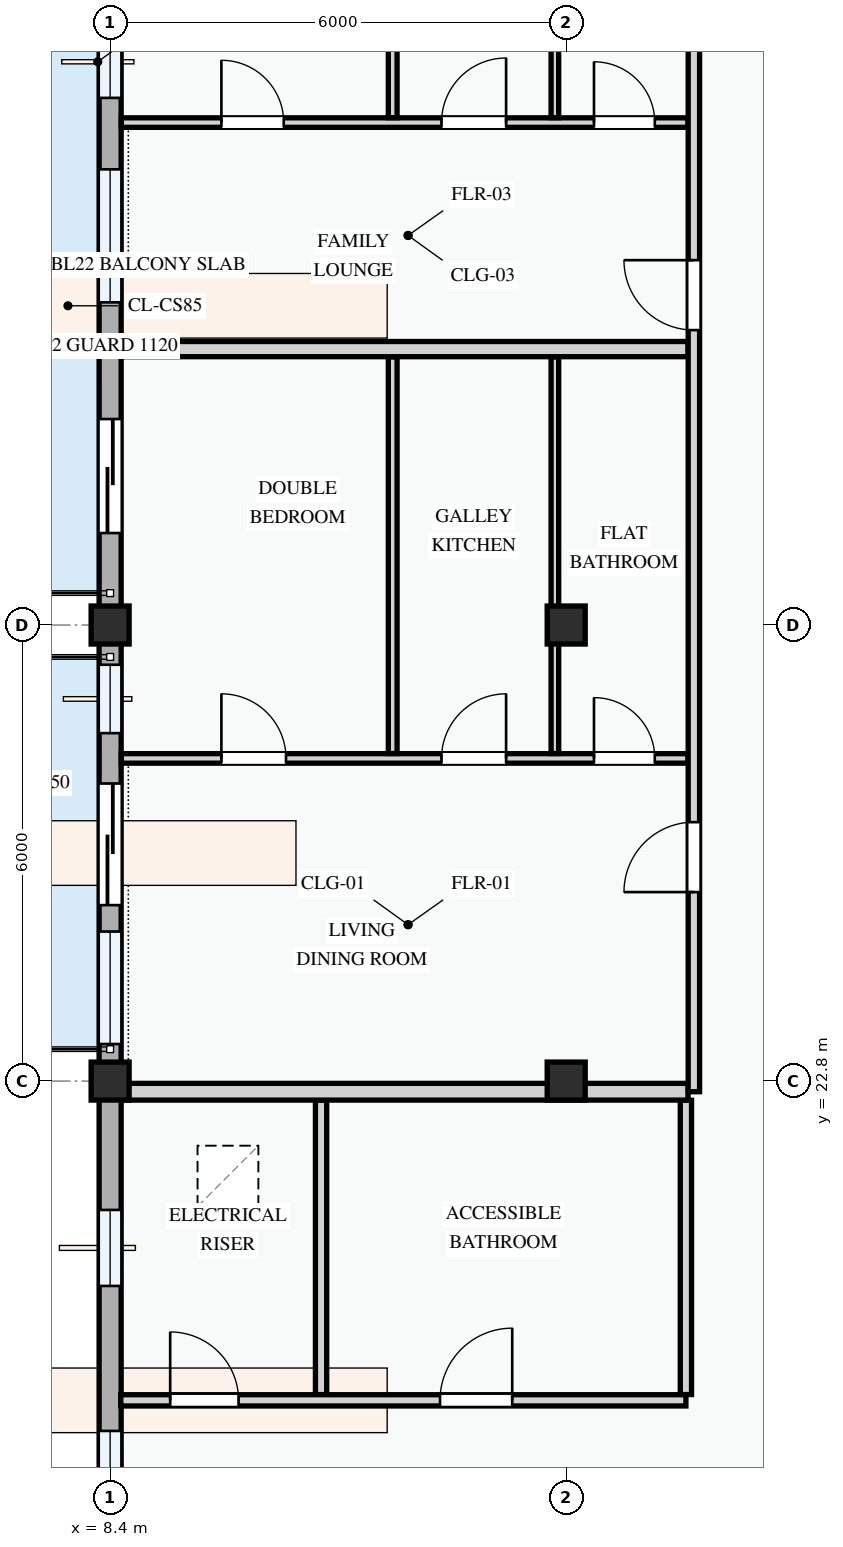
"""IFC4 building model, lengths in metres.
Left out: names, types, materials, properties, quantities, classifications, styles, units other than length and angle.
Written with IfcOpenShell. Run it as: python <this file> out.ifc"""

import sys

from ifc_helpers import new_model, si_unit, direction, frame, frame_2d, origin, origin_2d, place, context, subcontext, project, spatial, rectangle, extrude, element, fill, save


model = new_model("IFC4")
c1 = context("Model", 3, precision=1e-05, world=origin(), true_north=direction((0.0, 1.0)))
c2 = subcontext(c1, "Body", "Model", "MODEL_VIEW")
j1 = project(units=[si_unit("LENGTHUNIT", "METRE"), si_unit("PLANEANGLEUNIT", "RADIAN")], contexts=[c1])
p1 = place(None, origin())
s1 = spatial("IfcSite", under=j1, at=p1, CompositionType="ELEMENT")
p2 = place(p1, origin())
s2 = spatial("IfcBuilding", under=s1, at=p2, CompositionType="ELEMENT")
p3 = place(p2, frame((0.0, 0.0, 21.3)))
s3 = spatial("IfcBuildingStorey", under=s2, at=p3, CompositionType="ELEMENT", Elevation=21.3)
for number, where, z_axis, x_axis in (
    (1, (8.4, 22.8, 0.0), (0.0, 0.0, 1.0), (1.0, 0.0, 0.0)),
    (2, (8.4, 28.8, 0.0), (0.0, 0.0, 1.0), (1.0, 0.0, 0.0)),
    (3, (14.4, 22.8, 0.0), (0.0, 0.0, 1.0), (1.0, 0.0, 0.0)),
    (4, (14.4, 28.8, 0.0), (0.0, 0.0, 1.0), (1.0, 0.0, 0.0)),
):
    element("IfcColumn", number, at=place(p3, frame(where, z_axis=z_axis, x_axis=x_axis)), inside=s3, PredefinedType="COLUMN", context=c2, shape_type="SweptSolid", body=[
        extrude(rectangle(XDim=0.5, YDim=0.5, at=origin_2d()), origin(), (0.0, 0.0, 1.0), 3.3),
    ])
p4 = place(p3, frame((8.4, 37.2, 0.0), z_axis=(0.0, 0.0, 1.0), x_axis=(0.0, -1.0, 0.0)))
e5 = element("IfcWall", 5, at=p4, inside=s3, PredefinedType="STANDARD", context=c2, shape_type="SweptSolid", body=[
    extrude(rectangle(XDim=8.4, YDim=0.29, at=frame_2d((4.2, 0.0))), origin(), (0.0, 0.0, 1.0), 2.345),
])
p5 = place(p4, frame((5.69, 0.0, 0.0)))
e6 = element("IfcOpeningElement", 6, at=p5, cuts=e5, PredefinedType="OPENING", context=c2, shape_type="SweptSolid", body=[
    extrude(rectangle(XDim=1.5, YDim=2.2, at=frame_2d((0.75, 1.1))), frame((0.0, 0.155, 0.0), z_axis=(0.0, -1.0, 0.0), x_axis=(1.0, 0.0, 0.0)), (0.0, 0.0, 1.0), 0.31),
])
p6 = place(p4, frame((0.515, 0.0, 0.78)))
e7 = element("IfcOpeningElement", 7, at=p6, cuts=e5, PredefinedType="OPENING", context=c2, shape_type="SweptSolid", body=[
    extrude(rectangle(XDim=0.95, YDim=1.15, at=frame_2d((0.475, 0.575))), frame((0.0, 0.155, 0.0), z_axis=(0.0, -1.0, 0.0), x_axis=(1.0, 0.0, 0.0)), (0.0, 0.0, 1.0), 0.31),
])
p7 = place(p4, frame((2.405, 0.0, 0.78)))
e8 = element("IfcOpeningElement", 8, at=p7, cuts=e5, PredefinedType="OPENING", context=c2, shape_type="SweptSolid", body=[
    extrude(rectangle(XDim=1.75, YDim=1.45, at=frame_2d((0.875, 0.725))), frame((0.0, 0.155, 0.0), z_axis=(0.0, -1.0, 0.0), x_axis=(1.0, 0.0, 0.0)), (0.0, 0.0, 1.0), 0.31),
])
p8 = place(p3, frame((8.4, 28.8, 0.0), z_axis=(0.0, 0.0, 1.0), x_axis=(0.0, -1.0, 0.0)))
e9 = element("IfcWall", 9, at=p8, inside=s3, PredefinedType="STANDARD", context=c2, shape_type="SweptSolid", body=[
    extrude(rectangle(XDim=6.0, YDim=0.29, at=frame_2d((3.0, 0.0))), origin(), (0.0, 0.0, 1.0), 2.445),
])
p9 = place(p8, frame((2.085, 0.0, 0.0)))
e10 = element("IfcOpeningElement", 10, at=p9, cuts=e9, PredefinedType="OPENING", context=c2, shape_type="SweptSolid", body=[
    extrude(rectangle(XDim=1.6, YDim=2.2, at=frame_2d((0.8, 1.1))), frame((0.0, 0.155, 0.0), z_axis=(0.0, -1.0, 0.0), x_axis=(1.0, 0.0, 0.0)), (0.0, 0.0, 1.0), 0.31),
])
p10 = place(p8, frame((0.522, 0.0, 0.78)))
e11 = element("IfcOpeningElement", 11, at=p10, cuts=e9, PredefinedType="OPENING", context=c2, shape_type="SweptSolid", body=[
    extrude(rectangle(XDim=0.9, YDim=1.2, at=frame_2d((0.45, 0.6))), frame((0.0, 0.155, 0.0), z_axis=(0.0, -1.0, 0.0), x_axis=(1.0, 0.0, 0.0)), (0.0, 0.0, 1.0), 0.31),
])
p11 = place(p8, frame((4.032, 0.0, 0.78)))
e12 = element("IfcOpeningElement", 12, at=p11, cuts=e9, PredefinedType="OPENING", context=c2, shape_type="SweptSolid", body=[
    extrude(rectangle(XDim=1.48, YDim=1.52, at=frame_2d((0.74, 0.76))), frame((0.0, 0.155, 0.0), z_axis=(0.0, -1.0, 0.0), x_axis=(1.0, 0.0, 0.0)), (0.0, 0.0, 1.0), 0.31),
])
p12 = place(p3, frame((8.4, 22.8, 0.0), z_axis=(0.0, 0.0, 1.0), x_axis=(0.0, -1.0, 0.0)))
e13 = element("IfcWall", 13, at=p12, inside=s3, PredefinedType="STANDARD", context=c2, shape_type="SweptSolid", body=[
    extrude(rectangle(XDim=8.4, YDim=0.29, at=frame_2d((4.2, 0.0))), origin(), (0.0, 0.0, 1.0), 2.345),
])
p13 = place(p12, frame((1.695, 0.0, 0.78)))
e14 = element("IfcOpeningElement", 14, at=p13, cuts=e13, PredefinedType="OPENING", context=c2, shape_type="SweptSolid", body=[
    extrude(rectangle(XDim=1.0, YDim=1.25, at=frame_2d((0.5, 0.625))), frame((0.0, 0.155, 0.0), z_axis=(0.0, -1.0, 0.0), x_axis=(1.0, 0.0, 0.0)), (0.0, 0.0, 1.0), 0.31),
])
p14 = place(p12, frame((4.603, 0.0, 0.78)))
e15 = element("IfcOpeningElement", 15, at=p14, cuts=e13, PredefinedType="OPENING", context=c2, shape_type="SweptSolid", body=[
    extrude(rectangle(XDim=2.12, YDim=1.44, at=frame_2d((1.06, 0.72))), frame((0.0, 0.155, 0.0), z_axis=(0.0, -1.0, 0.0), x_axis=(1.0, 0.0, 0.0)), (0.0, 0.0, 1.0), 0.31),
])
for number, where, z_axis, x_axis in (
    (16, (11.175, 18.676, 0.0), (0.0, 0.0, 1.0), (0.0, 1.0, 0.0)),
    (17, (15.975, 18.676, 0.0), (0.0, 0.0, 1.0), (0.0, 1.0, 0.0)),
):
    element("IfcWall", number, at=place(p3, frame(where, z_axis=z_axis, x_axis=x_axis)), inside=s3, PredefinedType="PARTITIONING", context=c2, shape_type="SweptSolid", body=[
        extrude(rectangle(XDim=3.872, YDim=0.148, at=frame_2d((1.936, 0.0))), origin(), (0.0, 0.0, 1.0), 3.0),
    ])
p15 = place(p3, frame((8.54, 18.6, 0.0), z_axis=(0.0, 0.0, 1.0), x_axis=(1.0, 0.0, 0.0)))
e18 = element("IfcWall", 18, at=p15, inside=s3, PredefinedType="PARTITIONING", context=c2, shape_type="SweptSolid", body=[
    extrude(rectangle(XDim=7.435, YDim=0.148, at=frame_2d((3.718, 0.0))), origin(), (0.0, 0.0, 1.0), 3.0),
])
p16 = place(p15, frame((0.65, 0.0, 0.0)))
e19 = element("IfcOpeningElement", 19, at=p16, cuts=e18, PredefinedType="OPENING", context=c2, shape_type="SweptSolid", body=[
    extrude(rectangle(XDim=0.9, YDim=2.1, at=frame_2d((0.45, 1.05))), frame((0.0, 0.084, 0.0), z_axis=(0.0, -1.0, 0.0), x_axis=(1.0, 0.0, 0.0)), (0.0, 0.0, 1.0), 0.168),
])
p17 = place(p15, frame((4.2, 0.0, 0.0)))
e20 = element("IfcOpeningElement", 20, at=p17, cuts=e18, PredefinedType="OPENING", context=c2, shape_type="SweptSolid", body=[
    extrude(rectangle(XDim=0.95, YDim=2.1, at=frame_2d((0.475, 1.05))), frame((0.0, 0.084, 0.0), z_axis=(0.0, -1.0, 0.0), x_axis=(1.0, 0.0, 0.0)), (0.0, 0.0, 1.0), 0.168),
])
p18 = place(p3, frame((8.547, 27.045, 0.0), z_axis=(0.0, 0.0, 1.0), x_axis=(1.0, 0.0, 0.0)))
e21 = element("IfcWall", 21, at=p18, inside=s3, PredefinedType="PARTITIONING", context=c2, shape_type="SweptSolid", body=[
    extrude(rectangle(XDim=7.456, YDim=0.125, at=frame_2d((3.728, 0.0))), origin(), (0.0, 0.0, 1.0), 3.0),
])
p19 = place(p18, frame((1.317, 0.0, 0.0)))
e22 = element("IfcOpeningElement", 22, at=p19, cuts=e21, PredefinedType="OPENING", context=c2, shape_type="SweptSolid", body=[
    extrude(rectangle(XDim=0.85, YDim=2.1, at=frame_2d((0.425, 1.05))), frame((0.0, 0.073, 0.0), z_axis=(0.0, -1.0, 0.0), x_axis=(1.0, 0.0, 0.0)), (0.0, 0.0, 1.0), 0.145),
])
p20 = place(p18, frame((4.212, 0.0, 0.0)))
e23 = element("IfcOpeningElement", 23, at=p20, cuts=e21, PredefinedType="OPENING", context=c2, shape_type="SweptSolid", body=[
    extrude(rectangle(XDim=0.85, YDim=2.1, at=frame_2d((0.425, 1.05))), frame((0.0, 0.073, 0.0), z_axis=(0.0, -1.0, 0.0), x_axis=(1.0, 0.0, 0.0)), (0.0, 0.0, 1.0), 0.145),
])
p21 = place(p18, frame((6.219, 0.0, 0.0)))
e24 = element("IfcOpeningElement", 24, at=p21, cuts=e21, PredefinedType="OPENING", context=c2, shape_type="SweptSolid", body=[
    extrude(rectangle(XDim=0.8, YDim=2.1, at=frame_2d((0.4, 1.05))), frame((0.0, 0.073, 0.0), z_axis=(0.0, -1.0, 0.0), x_axis=(1.0, 0.0, 0.0)), (0.0, 0.0, 1.0), 0.145),
])
p22 = place(p3, frame((12.118, 27.11, 0.0), z_axis=(0.0, 0.0, 1.0), x_axis=(0.0, 1.0, 0.0)))
e25 = element("IfcWall", 25, at=p22, inside=s3, PredefinedType="PARTITIONING", context=c2, shape_type="SweptSolid", body=[
    extrude(rectangle(XDim=5.218, YDim=0.115, at=frame_2d((2.609, 0.0))), origin(), (0.0, 0.0, 1.0), 3.0),
])
p23 = place(p3, frame((14.251, 27.11, 0.0), z_axis=(0.0, 0.0, 1.0), x_axis=(0.0, 1.0, 0.0)))
e26 = element("IfcWall", 26, at=p23, inside=s3, PredefinedType="PARTITIONING", context=c2, shape_type="SweptSolid", body=[
    extrude(rectangle(XDim=5.218, YDim=0.1, at=frame_2d((2.609, 0.0))), origin(), (0.0, 0.0, 1.0), 2.425),
])
p24 = place(p3, frame((8.547, 22.66, 0.0), z_axis=(0.0, 0.0, 1.0), x_axis=(1.0, 0.0, 0.0)))
e27 = element("IfcWall", 27, at=p24, inside=s3, PredefinedType="PARTITIONING", context=c2, shape_type="SweptSolid", body=[
    extrude(rectangle(XDim=7.456, YDim=0.22, at=frame_2d((3.728, 0.0))), origin(), (0.0, 0.0, 1.0), 2.375),
])
p25 = place(p3, frame((8.547, 35.41, 0.0), z_axis=(0.0, 0.0, 1.0), x_axis=(1.0, 0.0, 0.0)))
e28 = element("IfcWall", 28, at=p25, inside=s3, PredefinedType="PARTITIONING", context=c2, shape_type="SweptSolid", body=[
    extrude(rectangle(XDim=7.456, YDim=0.125, at=frame_2d((3.728, 0.0))), origin(), (0.0, 0.0, 1.0), 3.0),
])
p26 = place(p25, frame((1.317, 0.0, 0.0)))
e29 = element("IfcOpeningElement", 29, at=p26, cuts=e28, PredefinedType="OPENING", context=c2, shape_type="SweptSolid", body=[
    extrude(rectangle(XDim=0.82, YDim=2.08, at=frame_2d((0.41, 1.04))), frame((0.0, 0.073, 0.0), z_axis=(0.0, -1.0, 0.0), x_axis=(1.0, 0.0, 0.0)), (0.0, 0.0, 1.0), 0.145),
])
p27 = place(p25, frame((4.212, 0.0, 0.0)))
e30 = element("IfcOpeningElement", 30, at=p27, cuts=e28, PredefinedType="OPENING", context=c2, shape_type="SweptSolid", body=[
    extrude(rectangle(XDim=0.85, YDim=2.1, at=frame_2d((0.425, 1.05))), frame((0.0, 0.073, 0.0), z_axis=(0.0, -1.0, 0.0), x_axis=(1.0, 0.0, 0.0)), (0.0, 0.0, 1.0), 0.145),
])
p28 = place(p25, frame((6.219, 0.0, 0.0)))
e31 = element("IfcOpeningElement", 31, at=p28, cuts=e28, PredefinedType="OPENING", context=c2, shape_type="SweptSolid", body=[
    extrude(rectangle(XDim=0.8, YDim=2.1, at=frame_2d((0.4, 1.05))), frame((0.0, 0.073, 0.0), z_axis=(0.0, -1.0, 0.0), x_axis=(1.0, 0.0, 0.0)), (0.0, 0.0, 1.0), 0.145),
])
p29 = place(p3, frame((12.118, 35.475, 0.0), z_axis=(0.0, 0.0, 1.0), x_axis=(0.0, 1.0, 0.0)))
e32 = element("IfcWall", 32, at=p29, inside=s3, PredefinedType="PARTITIONING", context=c2, shape_type="SweptSolid", body=[
    extrude(rectangle(XDim=5.821, YDim=0.115, at=frame_2d((2.91, 0.0))), origin(), (0.0, 0.0, 1.0), 3.0),
])
p30 = place(p3, frame((14.251, 35.475, 0.0), z_axis=(0.0, 0.0, 1.0), x_axis=(0.0, 1.0, 0.0)))
e33 = element("IfcWall", 33, at=p30, inside=s3, PredefinedType="PARTITIONING", context=c2, shape_type="SweptSolid", body=[
    extrude(rectangle(XDim=5.821, YDim=0.1, at=frame_2d((2.91, 0.0))), origin(), (0.0, 0.0, 1.0), 2.425),
])
p31 = place(p3, frame((8.547, 32.43, 0.0), z_axis=(0.0, 0.0, 1.0), x_axis=(1.0, 0.0, 0.0)))
e34 = element("IfcWall", 34, at=p31, inside=s3, PredefinedType="PARTITIONING", context=c2, shape_type="SweptSolid", body=[
    extrude(rectangle(XDim=7.456, YDim=0.2, at=frame_2d((3.728, 0.0))), origin(), (0.0, 0.0, 1.0), 3.0),
])
p32 = place(p3, frame((16.08, 22.66, 0.0), z_axis=(0.0, 0.0, 1.0), x_axis=(0.0, 1.0, 0.0)))
e35 = element("IfcWall", 35, at=p32, inside=s3, PredefinedType="PARTITIONING", context=c2, shape_type="SweptSolid", body=[
    extrude(rectangle(XDim=34.793, YDim=0.15, at=frame_2d((17.396, 0.0))), origin(), (0.0, 0.0, 1.0), 3.0),
])
p33 = place(p32, frame((2.627, 0.0, 0.0)))
e36 = element("IfcOpeningElement", 36, at=p33, cuts=e35, PredefinedType="OPENING", context=c2, shape_type="SweptSolid", body=[
    extrude(rectangle(XDim=0.92, YDim=2.1, at=frame_2d((0.46, 1.05))), frame((0.0, 0.085, 0.0), z_axis=(0.0, -1.0, 0.0), x_axis=(1.0, 0.0, 0.0)), (0.0, 0.0, 1.0), 0.17),
])
p34 = place(p32, frame((10.02, 0.0, 0.0)))
e37 = element("IfcOpeningElement", 37, at=p34, cuts=e35, PredefinedType="OPENING", context=c2, shape_type="SweptSolid", body=[
    extrude(rectangle(XDim=0.92, YDim=2.1, at=frame_2d((0.46, 1.05))), frame((0.0, 0.085, 0.0), z_axis=(0.0, -1.0, 0.0), x_axis=(1.0, 0.0, 0.0)), (0.0, 0.0, 1.0), 0.17),
])
p35 = place(p32, frame((24.355, 0.0, 0.0)))
e38 = element("IfcOpeningElement", 38, at=p35, cuts=e35, PredefinedType="OPENING", context=c2, shape_type="SweptSolid", body=[
    extrude(rectangle(XDim=0.92, YDim=2.1, at=frame_2d((0.46, 1.05))), frame((0.0, 0.085, 0.0), z_axis=(0.0, -1.0, 0.0), x_axis=(1.0, 0.0, 0.0)), (0.0, 0.0, 1.0), 0.17),
])
p36 = place(p5, frame((1.5, 0.0, 0.0), z_axis=(0.0, 0.0, 1.0), x_axis=(-1.0, 0.0, 0.0)))
e39 = element("IfcDoor", 39, at=p36, inside=s3, OperationType="SLIDING_TO_RIGHT", PredefinedType="DOOR", context=c2, shape_type="SweptSolid", body=[
    extrude(rectangle(XDim=1.5, YDim=2.2, at=frame_2d((0.75, 1.1))), frame((0.0, 0.025, 0.0), z_axis=(0.0, -1.0, 0.0), x_axis=(1.0, 0.0, 0.0)), (0.0, 0.0, 1.0), 0.05),
])
fill(e6, e39)
p37 = place(p6, origin())
e40 = element("IfcWindow", 40, at=p37, inside=s3, PartitioningType="SINGLE_PANEL", PredefinedType="WINDOW", context=c2, shape_type="SweptSolid", body=[
    extrude(rectangle(XDim=0.95, YDim=1.15, at=frame_2d((0.475, 0.575))), frame((0.0, 0.03, 0.0), z_axis=(0.0, -1.0, 0.0), x_axis=(1.0, 0.0, 0.0)), (0.0, 0.0, 1.0), 0.06),
])
fill(e7, e40)
p38 = place(p7, origin())
e41 = element("IfcWindow", 41, at=p38, inside=s3, PartitioningType="DOUBLE_PANEL_VERTICAL", PredefinedType="WINDOW", context=c2, shape_type="SweptSolid", body=[
    extrude(rectangle(XDim=1.75, YDim=1.45, at=frame_2d((0.875, 0.725))), frame((0.0, 0.03, 0.0), z_axis=(0.0, -1.0, 0.0), x_axis=(1.0, 0.0, 0.0)), (0.0, 0.0, 1.0), 0.06),
])
fill(e8, e41)
p39 = place(p9, frame((1.6, 0.0, 0.0), z_axis=(0.0, 0.0, 1.0), x_axis=(-1.0, 0.0, 0.0)))
e42 = element("IfcDoor", 42, at=p39, inside=s3, OperationType="SLIDING_TO_LEFT", PredefinedType="DOOR", context=c2, shape_type="SweptSolid", body=[
    extrude(rectangle(XDim=1.6, YDim=2.2, at=frame_2d((0.8, 1.1))), frame((0.0, 0.025, 0.0), z_axis=(0.0, -1.0, 0.0), x_axis=(1.0, 0.0, 0.0)), (0.0, 0.0, 1.0), 0.05),
])
fill(e10, e42)
p40 = place(p10, origin())
e43 = element("IfcWindow", 43, at=p40, inside=s3, PartitioningType="SINGLE_PANEL", PredefinedType="WINDOW", context=c2, shape_type="SweptSolid", body=[
    extrude(rectangle(XDim=0.9, YDim=1.2, at=frame_2d((0.45, 0.6))), frame((0.0, 0.03, 0.0), z_axis=(0.0, -1.0, 0.0), x_axis=(1.0, 0.0, 0.0)), (0.0, 0.0, 1.0), 0.06),
])
fill(e11, e43)
p41 = place(p11, origin())
e44 = element("IfcWindow", 44, at=p41, inside=s3, PartitioningType="SINGLE_PANEL", PredefinedType="WINDOW", context=c2, shape_type="SweptSolid", body=[
    extrude(rectangle(XDim=1.48, YDim=1.52, at=frame_2d((0.74, 0.76))), frame((0.0, 0.03, 0.0), z_axis=(0.0, -1.0, 0.0), x_axis=(1.0, 0.0, 0.0)), (0.0, 0.0, 1.0), 0.06),
])
fill(e12, e44)
p42 = place(p13, origin())
e45 = element("IfcWindow", 45, at=p42, inside=s3, PartitioningType="SINGLE_PANEL", PredefinedType="WINDOW", context=c2, shape_type="SweptSolid", body=[
    extrude(rectangle(XDim=1.0, YDim=1.25, at=frame_2d((0.5, 0.625))), frame((0.0, 0.03, 0.0), z_axis=(0.0, -1.0, 0.0), x_axis=(1.0, 0.0, 0.0)), (0.0, 0.0, 1.0), 0.06),
])
fill(e14, e45)
p43 = place(p14, origin())
e46 = element("IfcWindow", 46, at=p43, inside=s3, PartitioningType="DOUBLE_PANEL_VERTICAL", PredefinedType="WINDOW", context=c2, shape_type="SweptSolid", body=[
    extrude(rectangle(XDim=2.12, YDim=1.44, at=frame_2d((1.06, 0.72))), frame((0.0, 0.03, 0.0), z_axis=(0.0, -1.0, 0.0), x_axis=(1.0, 0.0, 0.0)), (0.0, 0.0, 1.0), 0.06),
])
fill(e15, e46)
p44 = place(p16, origin())
e47 = element("IfcDoor", 47, at=p44, inside=s3, OperationType="SINGLE_SWING_LEFT", PredefinedType="DOOR", context=c2, shape_type="SweptSolid", body=[
    extrude(rectangle(XDim=0.9, YDim=2.1, at=frame_2d((0.45, 1.05))), frame((0.0, 0.025, 0.0), z_axis=(0.0, -1.0, 0.0), x_axis=(1.0, 0.0, 0.0)), (0.0, 0.0, 1.0), 0.05),
])
fill(e19, e47)
p45 = place(p17, origin())
e48 = element("IfcDoor", 48, at=p45, inside=s3, OperationType="SINGLE_SWING_RIGHT", PredefinedType="DOOR", context=c2, shape_type="SweptSolid", body=[
    extrude(rectangle(XDim=0.95, YDim=2.1, at=frame_2d((0.475, 1.05))), frame((0.0, 0.025, 0.0), z_axis=(0.0, -1.0, 0.0), x_axis=(1.0, 0.0, 0.0)), (0.0, 0.0, 1.0), 0.05),
])
fill(e20, e48)
p46 = place(p19, origin())
e49 = element("IfcDoor", 49, at=p46, inside=s3, OperationType="SINGLE_SWING_LEFT", PredefinedType="DOOR", context=c2, shape_type="SweptSolid", body=[
    extrude(rectangle(XDim=0.85, YDim=2.1, at=frame_2d((0.425, 1.05))), frame((0.0, 0.025, 0.0), z_axis=(0.0, -1.0, 0.0), x_axis=(1.0, 0.0, 0.0)), (0.0, 0.0, 1.0), 0.05),
])
fill(e22, e49)
p47 = place(p20, origin())
e50 = element("IfcDoor", 50, at=p47, inside=s3, OperationType="SINGLE_SWING_RIGHT", PredefinedType="DOOR", context=c2, shape_type="SweptSolid", body=[
    extrude(rectangle(XDim=0.85, YDim=2.1, at=frame_2d((0.425, 1.05))), frame((0.0, 0.025, 0.0), z_axis=(0.0, -1.0, 0.0), x_axis=(1.0, 0.0, 0.0)), (0.0, 0.0, 1.0), 0.05),
])
fill(e23, e50)
p48 = place(p21, origin())
e51 = element("IfcDoor", 51, at=p48, inside=s3, OperationType="SINGLE_SWING_LEFT", PredefinedType="DOOR", context=c2, shape_type="SweptSolid", body=[
    extrude(rectangle(XDim=0.8, YDim=2.1, at=frame_2d((0.4, 1.05))), frame((0.0, 0.025, 0.0), z_axis=(0.0, -1.0, 0.0), x_axis=(1.0, 0.0, 0.0)), (0.0, 0.0, 1.0), 0.05),
])
fill(e24, e51)
p49 = place(p26, origin())
e52 = element("IfcDoor", 52, at=p49, inside=s3, OperationType="SINGLE_SWING_LEFT", PredefinedType="DOOR", context=c2, shape_type="SweptSolid", body=[
    extrude(rectangle(XDim=0.82, YDim=2.08, at=frame_2d((0.41, 1.04))), frame((0.0, 0.025, 0.0), z_axis=(0.0, -1.0, 0.0), x_axis=(1.0, 0.0, 0.0)), (0.0, 0.0, 1.0), 0.05),
])
fill(e29, e52)
p50 = place(p27, origin())
e53 = element("IfcDoor", 53, at=p50, inside=s3, OperationType="SINGLE_SWING_RIGHT", PredefinedType="DOOR", context=c2, shape_type="SweptSolid", body=[
    extrude(rectangle(XDim=0.85, YDim=2.1, at=frame_2d((0.425, 1.05))), frame((0.0, 0.025, 0.0), z_axis=(0.0, -1.0, 0.0), x_axis=(1.0, 0.0, 0.0)), (0.0, 0.0, 1.0), 0.05),
])
fill(e30, e53)
p51 = place(p28, origin())
e54 = element("IfcDoor", 54, at=p51, inside=s3, OperationType="SINGLE_SWING_LEFT", PredefinedType="DOOR", context=c2, shape_type="SweptSolid", body=[
    extrude(rectangle(XDim=0.8, YDim=2.1, at=frame_2d((0.4, 1.05))), frame((0.0, 0.025, 0.0), z_axis=(0.0, -1.0, 0.0), x_axis=(1.0, 0.0, 0.0)), (0.0, 0.0, 1.0), 0.05),
])
fill(e31, e54)
p52 = place(p33, origin())
e55 = element("IfcDoor", 55, at=p52, inside=s3, OperationType="SINGLE_SWING_LEFT", PredefinedType="DOOR", context=c2, shape_type="SweptSolid", body=[
    extrude(rectangle(XDim=0.92, YDim=2.1, at=frame_2d((0.46, 1.05))), frame((0.0, 0.025, 0.0), z_axis=(0.0, -1.0, 0.0), x_axis=(1.0, 0.0, 0.0)), (0.0, 0.0, 1.0), 0.05),
])
fill(e36, e55)
p53 = place(p34, origin())
e56 = element("IfcDoor", 56, at=p53, inside=s3, OperationType="SINGLE_SWING_RIGHT", PredefinedType="DOOR", context=c2, shape_type="SweptSolid", body=[
    extrude(rectangle(XDim=0.92, YDim=2.1, at=frame_2d((0.46, 1.05))), frame((0.0, 0.025, 0.0), z_axis=(0.0, -1.0, 0.0), x_axis=(1.0, 0.0, 0.0)), (0.0, 0.0, 1.0), 0.05),
])
fill(e37, e56)
save(model, sys.argv[1])
